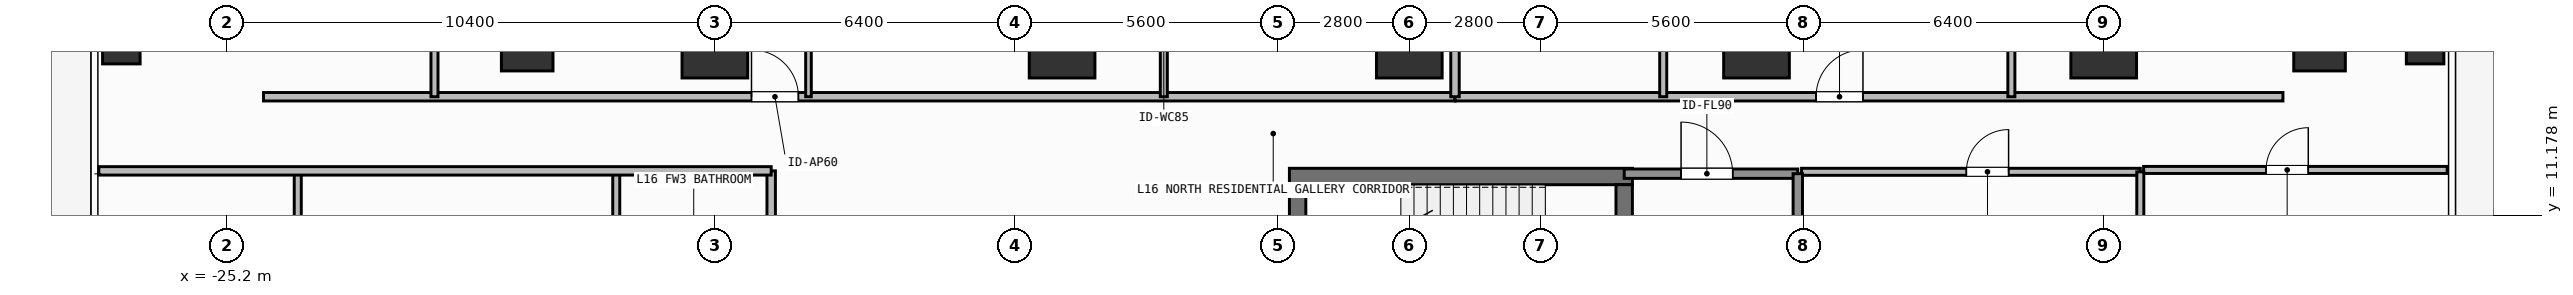
"""IFC4 building model, lengths in metres.
Left out: names, types, materials, properties, quantities, classifications, styles, units other than length and angle.
Written with IfcOpenShell. Run it as: python <this file> out.ifc"""

import sys

from ifc_helpers import new_model, si_unit, direction, frame, frame_2d, origin, origin_2d, place, context, subcontext, project, spatial, rectangle, hollow_rectangle, extrude, element, fill, save


model = new_model("IFC4")
c1 = context("Model", 3, precision=1e-05, world=origin(), true_north=direction((0.0, 1.0)))
c2 = subcontext(c1, "Body", "Model", "MODEL_VIEW")
j1 = project(units=[si_unit("LENGTHUNIT", "METRE"), si_unit("PLANEANGLEUNIT", "RADIAN")], contexts=[c1])
p1 = place(None, origin())
s1 = spatial("IfcSite", under=j1, at=p1, CompositionType="ELEMENT")
p2 = place(p1, origin())
s2 = spatial("IfcBuilding", under=s1, at=p2, CompositionType="ELEMENT")
p3 = place(p2, frame((0.0, 0.0, 61.8)))
s3 = spatial("IfcBuildingStorey", under=s2, at=p3, CompositionType="ELEMENT", Elevation=61.8)
p4 = place(p3, frame((-2.555, 12.0, 0.0), z_axis=(0.0, 0.0, 1.0), x_axis=(1.0, 0.0, 0.0)))
e1 = element("IfcWall", 1, at=p4, inside=s3, PredefinedType="SHEAR", context=c2, shape_type="SweptSolid", body=[
    extrude(rectangle(XDim=7.31, YDim=0.35, at=frame_2d((3.655, 0.0))), origin(), (0.0, 0.0, 1.0), 3.9),
])
p5 = place(p3, frame((-2.38, 8.9, 0.0), z_axis=(0.0, 0.0, 1.0), x_axis=(0.0, 1.0, 0.0)))
e2 = element("IfcWall", 2, at=p5, inside=s3, PredefinedType="SHEAR", context=c2, shape_type="SweptSolid", body=[
    extrude(rectangle(XDim=2.925, YDim=0.35, at=frame_2d((1.462, 0.0))), origin(), (0.0, 0.0, 1.0), 3.9),
])
p6 = place(p3, frame((4.58, 11.825, 0.0), z_axis=(0.0, 0.0, 1.0), x_axis=(0.0, -1.0, 0.0)))
e3 = element("IfcWall", 3, at=p6, inside=s3, PredefinedType="SHEAR", context=c2, shape_type="SweptSolid", body=[
    extrude(rectangle(XDim=2.925, YDim=0.35, at=frame_2d((1.462, 0.0))), origin(), (0.0, 0.0, 1.0), 3.9),
])
p7 = place(p6, frame((0.913, 0.0, 0.0)))
e4 = element("IfcOpeningElement", 4, at=p7, cuts=e3, PredefinedType="OPENING", context=c2, shape_type="SweptSolid", body=[
    extrude(rectangle(XDim=1.1, YDim=2.15, at=frame_2d((0.55, 1.075))), frame((0.0, 0.185, 0.0), z_axis=(0.0, -1.0, 0.0), x_axis=(1.0, 0.0, 0.0)), (0.0, 0.0, 1.0), 0.37),
])
for number, where, z_axis, x_axis in (
    (5, (-14.8, 14.8, 0.0), (0.0, 0.0, 1.0), (1.0, 0.0, 0.0)),
    (6, (-7.4, 14.8, 0.0), (0.0, 0.0, 1.0), (1.0, 0.0, 0.0)),
    (7, (0.0, 14.8, 0.0), (0.0, 0.0, 1.0), (1.0, 0.0, 0.0)),
    (8, (7.4, 14.8, 0.0), (0.0, 0.0, 1.0), (1.0, 0.0, 0.0)),
    (9, (14.8, 14.8, 0.0), (0.0, 0.0, 1.0), (1.0, 0.0, 0.0)),
):
    element("IfcColumn", number, at=place(p3, frame(where, z_axis=z_axis, x_axis=x_axis)), inside=s3, PredefinedType="COLUMN", context=c2, shape_type="SweptSolid", body=[
        extrude(rectangle(XDim=1.4, YDim=1.4, at=origin_2d()), origin(), (0.0, 0.0, 1.0), 3.9),
    ])
for number, where, z_axis, x_axis in (
    (10, (-18.8, 14.8, 0.0), (0.0, 0.0, 1.0), (1.0, 0.0, 0.0)),
    (11, (19.4, 14.8, 0.0), (0.0, 0.0, 1.0), (1.0, 0.0, 0.0)),
):
    element("IfcColumn", number, at=place(p3, frame(where, z_axis=z_axis, x_axis=x_axis)), inside=s3, PredefinedType="COLUMN", context=c2, shape_type="SweptSolid", body=[
        extrude(rectangle(XDim=1.1, YDim=1.1, at=origin_2d()), origin(), (0.0, 0.0, 1.0), 3.9),
    ])
for number, where, z_axis, x_axis in (
    (12, (-27.45, 14.8, 0.0), (0.0, 0.0, 1.0), (1.0, 0.0, 0.0)),
    (13, (21.65, 14.8, 0.0), (0.0, 0.0, 1.0), (1.0, 0.0, 0.0)),
):
    element("IfcColumn", number, at=place(p3, frame(where, z_axis=z_axis, x_axis=x_axis)), inside=s3, PredefinedType="COLUMN", context=c2, shape_type="SweptSolid", body=[
        extrude(hollow_rectangle(XDim=0.8, YDim=0.8, WallThickness=0.036, at=origin_2d()), origin(), (0.0, 0.0, 1.0), 3.9),
    ])
p8 = place(p3, frame((4.58, 12.06, 0.0), z_axis=(0.0, 0.0, 1.0), x_axis=(1.0, 0.0, 0.0)))
e14 = element("IfcWall", 14, at=p8, inside=s3, PredefinedType="SOLIDWALL", context=c2, shape_type="SweptSolid", body=[
    extrude(rectangle(XDim=3.7, YDim=0.2, at=frame_2d((1.85, 0.0))), origin(), (0.0, 0.0, 1.0), 3.68),
])
p9 = place(p8, frame((1.212, 0.0, 0.0)))
e15 = element("IfcOpeningElement", 15, at=p9, cuts=e14, PredefinedType="OPENING", context=c2, shape_type="SweptSolid", body=[
    extrude(rectangle(XDim=1.1, YDim=2.15, at=frame_2d((0.55, 1.075))), frame((0.0, 0.11, 0.0), z_axis=(0.0, -1.0, 0.0), x_axis=(1.0, 0.0, 0.0)), (0.0, 0.0, 1.0), 0.22),
])
p10 = place(p3, frame((8.36, 12.1, 0.0), z_axis=(0.0, 0.0, 1.0), x_axis=(1.0, 0.0, 0.0)))
e16 = element("IfcWall", 16, at=p10, inside=s3, PredefinedType="PARTITIONING", context=c2, shape_type="SweptSolid", body=[
    extrude(rectangle(XDim=7.22, YDim=0.15, at=frame_2d((3.61, 0.0))), origin(), (0.0, 0.0, 1.0), 3.68),
])
p11 = place(p10, frame((3.513, 0.0, 0.0)))
e17 = element("IfcOpeningElement", 17, at=p11, cuts=e16, PredefinedType="OPENING", context=c2, shape_type="SweptSolid", body=[
    extrude(rectangle(XDim=0.9, YDim=2.1, at=frame_2d((0.45, 1.05))), frame((0.0, 0.085, 0.0), z_axis=(0.0, -1.0, 0.0), x_axis=(1.0, 0.0, 0.0)), (0.0, 0.0, 1.0), 0.17),
])
p12 = place(p3, frame((-24.42, 13.7, 0.0), z_axis=(0.0, 0.0, 1.0), x_axis=(1.0, 0.0, 0.0)))
e18 = element("IfcWall", 18, at=p12, inside=s3, PredefinedType="PARTITIONING", context=c2, shape_type="SweptSolid", body=[
    extrude(rectangle(XDim=25.394, YDim=0.18, at=frame_2d((12.697, 0.0))), origin(), (0.0, 0.0, 1.0), 3.68),
])
p13 = place(p12, frame((10.4, 0.0, 0.0)))
e19 = element("IfcOpeningElement", 19, at=p13, cuts=e18, PredefinedType="OPENING", context=c2, shape_type="SweptSolid", body=[
    extrude(rectangle(XDim=1.0, YDim=2.2, at=frame_2d((0.5, 1.1))), frame((0.0, 0.1, 0.0), z_axis=(0.0, -1.0, 0.0), x_axis=(1.0, 0.0, 0.0)), (0.0, 0.0, 1.0), 0.2),
])
p14 = place(p3, frame((-12.805, 13.7, 0.0), z_axis=(0.0, 0.0, 1.0), x_axis=(0.0, 1.0, 0.0)))
e20 = element("IfcWall", 20, at=p14, inside=s3, PredefinedType="PARTITIONING", context=c2, shape_type="SweptSolid", body=[
    extrude(rectangle(XDim=7.09, YDim=0.12, at=frame_2d((3.545, 0.0))), origin(), (0.0, 0.0, 1.0), 3.68),
])
p15 = place(p14, frame((3.006, 0.0, 0.0)))
e21 = element("IfcOpeningElement", 21, at=p15, cuts=e20, PredefinedType="OPENING", context=c2, shape_type="SweptSolid", body=[
    extrude(rectangle(XDim=0.9, YDim=2.1, at=frame_2d((0.45, 1.05))), frame((0.0, 0.07, 0.0), z_axis=(0.0, -1.0, 0.0), x_axis=(1.0, 0.0, 0.0)), (0.0, 0.0, 1.0), 0.14),
])
p16 = place(p3, frame((-20.776, 13.7, 0.0), z_axis=(0.0, 0.0, 1.0), x_axis=(0.0, 1.0, 0.0)))
e22 = element("IfcWall", 22, at=p16, inside=s3, PredefinedType="PARTITIONING", context=c2, shape_type="SweptSolid", body=[
    extrude(rectangle(XDim=7.09, YDim=0.15, at=frame_2d((3.545, 0.0))), origin(), (0.0, 0.0, 1.0), 3.68),
])
p17 = place(p16, frame((3.03, 0.0, 0.0)))
e23 = element("IfcOpeningElement", 23, at=p17, cuts=e22, PredefinedType="OPENING", context=c2, shape_type="SweptSolid", body=[
    extrude(rectangle(XDim=0.85, YDim=2.1, at=frame_2d((0.425, 1.05))), frame((0.0, 0.085, 0.0), z_axis=(0.0, -1.0, 0.0), x_axis=(1.0, 0.0, 0.0)), (0.0, 0.0, 1.0), 0.17),
])
p18 = place(p3, frame((-5.232, 13.7, 0.0), z_axis=(0.0, 0.0, 1.0), x_axis=(0.0, 1.0, 0.0)))
e24 = element("IfcWall", 24, at=p18, inside=s3, PredefinedType="PARTITIONING", context=c2, shape_type="SweptSolid", body=[
    extrude(rectangle(XDim=2.907, YDim=0.15, at=frame_2d((1.454, 0.0))), origin(), (0.0, 0.0, 1.0), 3.68),
])
p19 = place(p18, frame((1.029, 0.0, 0.0)))
e25 = element("IfcOpeningElement", 25, at=p19, cuts=e24, PredefinedType="OPENING", context=c2, shape_type="SweptSolid", body=[
    extrude(rectangle(XDim=0.85, YDim=2.1, at=frame_2d((0.425, 1.05))), frame((0.0, 0.085, 0.0), z_axis=(0.0, -1.0, 0.0), x_axis=(1.0, 0.0, 0.0)), (0.0, 0.0, 1.0), 0.17),
])
p20 = place(p3, frame((0.974, 13.7, 0.0), z_axis=(0.0, 0.0, 1.0), x_axis=(1.0, 0.0, 0.0)))
e26 = element("IfcWall", 26, at=p20, inside=s3, PredefinedType="PARTITIONING", context=c2, shape_type="SweptSolid", body=[
    extrude(rectangle(XDim=17.646, YDim=0.18, at=frame_2d((8.823, 0.0))), origin(), (0.0, 0.0, 1.0), 3.68),
])
p21 = place(p20, frame((7.695, 0.0, 0.0)))
e27 = element("IfcOpeningElement", 27, at=p21, cuts=e26, PredefinedType="OPENING", context=c2, shape_type="SweptSolid", body=[
    extrude(rectangle(XDim=1.0, YDim=2.2, at=frame_2d((0.5, 1.1))), frame((0.0, 0.1, 0.0), z_axis=(0.0, -1.0, 0.0), x_axis=(1.0, 0.0, 0.0)), (0.0, 0.0, 1.0), 0.2),
])
p22 = place(p3, frame((5.412, 13.7, 0.0), z_axis=(0.0, 0.0, 1.0), x_axis=(0.0, 1.0, 0.0)))
e28 = element("IfcWall", 28, at=p22, inside=s3, PredefinedType="PARTITIONING", context=c2, shape_type="SweptSolid", body=[
    extrude(rectangle(XDim=7.09, YDim=0.15, at=frame_2d((3.545, 0.0))), origin(), (0.0, 0.0, 1.0), 3.68),
])
p23 = place(p22, frame((3.03, 0.0, 0.0)))
e29 = element("IfcOpeningElement", 29, at=p23, cuts=e28, PredefinedType="OPENING", context=c2, shape_type="SweptSolid", body=[
    extrude(rectangle(XDim=0.85, YDim=2.1, at=frame_2d((0.425, 1.05))), frame((0.0, 0.085, 0.0), z_axis=(0.0, -1.0, 0.0), x_axis=(1.0, 0.0, 0.0)), (0.0, 0.0, 1.0), 0.17),
])
p24 = place(p3, frame((12.832, 13.7, 0.0), z_axis=(0.0, 0.0, 1.0), x_axis=(0.0, 1.0, 0.0)))
e30 = element("IfcWall", 30, at=p24, inside=s3, PredefinedType="PARTITIONING", context=c2, shape_type="SweptSolid", body=[
    extrude(rectangle(XDim=4.963, YDim=0.15, at=frame_2d((2.481, 0.0))), origin(), (0.0, 0.0, 1.0), 3.68),
])
p25 = place(p24, frame((2.056, 0.0, 0.0)))
e31 = element("IfcOpeningElement", 31, at=p25, cuts=e30, PredefinedType="OPENING", context=c2, shape_type="SweptSolid", body=[
    extrude(rectangle(XDim=0.85, YDim=2.1, at=frame_2d((0.425, 1.05))), frame((0.0, 0.085, 0.0), z_axis=(0.0, -1.0, 0.0), x_axis=(1.0, 0.0, 0.0)), (0.0, 0.0, 1.0), 0.17),
])
p26 = place(p3, frame((-13.6, 4.04, 0.0), z_axis=(0.0, 0.0, 1.0), x_axis=(0.0, 1.0, 0.0)))
e32 = element("IfcWall", 32, at=p26, inside=s3, PredefinedType="PARTITIONING", context=c2, shape_type="SweptSolid", body=[
    extrude(rectangle(XDim=8.08, YDim=0.18, at=frame_2d((4.04, 0.0))), origin(), (0.0, 0.0, 1.0), 3.68),
])
p27 = place(p26, frame((1.583, 0.0, 0.0)))
e33 = element("IfcOpeningElement", 33, at=p27, cuts=e32, PredefinedType="OPENING", context=c2, shape_type="SweptSolid", body=[
    extrude(rectangle(XDim=1.0, YDim=2.2, at=frame_2d((0.5, 1.1))), frame((0.0, 0.1, 0.0), z_axis=(0.0, -1.0, 0.0), x_axis=(1.0, 0.0, 0.0)), (0.0, 0.0, 1.0), 0.2),
])
p28 = place(p3, frame((15.65, 12.14, 0.0), z_axis=(0.0, 0.0, 1.0), x_axis=(1.0, 0.0, 0.0)))
e34 = element("IfcWall", 34, at=p28, inside=s3, PredefinedType="PARTITIONING", context=c2, shape_type="SweptSolid", body=[
    extrude(rectangle(XDim=6.47, YDim=0.15, at=frame_2d((3.235, 0.0))), origin(), (0.0, 0.0, 1.0), 3.68),
])
p29 = place(p28, frame((2.61, 0.0, 0.0)))
e35 = element("IfcOpeningElement", 35, at=p29, cuts=e34, PredefinedType="OPENING", context=c2, shape_type="SweptSolid", body=[
    extrude(rectangle(XDim=0.9, YDim=2.1, at=frame_2d((0.45, 1.05))), frame((0.0, 0.085, 0.0), z_axis=(0.0, -1.0, 0.0), x_axis=(1.0, 0.0, 0.0)), (0.0, 0.0, 1.0), 0.17),
])
p30 = place(p3, frame((8.28, 8.95, 0.0), z_axis=(0.0, 0.0, 1.0), x_axis=(0.0, 1.0, 0.0)))
e36 = element("IfcWall", 36, at=p30, inside=s3, PredefinedType="SOLIDWALL", context=c2, shape_type="SweptSolid", body=[
    extrude(rectangle(XDim=3.11, YDim=0.2, at=frame_2d((1.555, 0.0))), origin(), (0.0, 0.0, 1.0), 3.68),
])
p31 = place(p3, frame((15.58, 5.85, 0.0), z_axis=(0.0, 0.0, 1.0), x_axis=(0.0, 1.0, 0.0)))
e37 = element("IfcWall", 37, at=p31, inside=s3, PredefinedType="PARTITIONING", context=c2, shape_type="SweptSolid", body=[
    extrude(rectangle(XDim=6.25, YDim=0.15, at=frame_2d((3.125, 0.0))), origin(), (0.0, 0.0, 1.0), 3.68),
])
p32 = place(p3, frame((0.974, 13.7, 0.0), z_axis=(0.0, 0.0, 1.0), x_axis=(0.0, 1.0, 0.0)))
e38 = element("IfcWall", 38, at=p32, inside=s3, PredefinedType="PARTITIONING", context=c2, shape_type="SweptSolid", body=[
    extrude(rectangle(XDim=11.33, YDim=0.18, at=frame_2d((5.665, 0.0))), origin(), (0.0, 0.0, 1.0), 3.68),
])
for number, where, z_axis, x_axis in (
    (39, (-16.902, 9.32, 0.0), (0.0, 0.0, 1.0), (0.0, 1.0, 0.0)),
    (40, (-23.69, 9.32, 0.0), (0.0, 0.0, 1.0), (0.0, 1.0, 0.0)),
):
    element("IfcWall", number, at=place(p3, frame(where, z_axis=z_axis, x_axis=x_axis)), inside=s3, PredefinedType="PARTITIONING", context=c2, shape_type="SweptSolid", body=[
        extrude(rectangle(XDim=2.8, YDim=0.15, at=frame_2d((1.4, 0.0))), origin(), (0.0, 0.0, 1.0), 3.68),
    ])
p33 = place(p3, frame((-27.93, 12.12, 0.0), z_axis=(0.0, 0.0, 1.0), x_axis=(1.0, 0.0, 0.0)))
e41 = element("IfcWall", 41, at=p33, inside=s3, PredefinedType="PARTITIONING", context=c2, shape_type="SweptSolid", body=[
    extrude(rectangle(XDim=14.33, YDim=0.18, at=frame_2d((7.165, 0.0))), origin(), (0.0, 0.0, 1.0), 3.68),
])
p34 = place(p9, origin())
e42 = element("IfcDoor", 42, at=p34, inside=s3, OperationType="SINGLE_SWING_LEFT", PredefinedType="DOOR", context=c2, shape_type="SweptSolid", body=[
    extrude(rectangle(XDim=1.1, YDim=2.15, at=frame_2d((0.55, 1.075))), frame((0.0, 0.025, 0.0), z_axis=(0.0, -1.0, 0.0), x_axis=(1.0, 0.0, 0.0)), (0.0, 0.0, 1.0), 0.05),
])
fill(e15, e42)
p35 = place(p11, origin())
e43 = element("IfcDoor", 43, at=p35, inside=s3, OperationType="SINGLE_SWING_RIGHT", PredefinedType="DOOR", context=c2, shape_type="SweptSolid", body=[
    extrude(rectangle(XDim=0.9, YDim=2.1, at=frame_2d((0.45, 1.05))), frame((0.0, 0.025, 0.0), z_axis=(0.0, -1.0, 0.0), x_axis=(1.0, 0.0, 0.0)), (0.0, 0.0, 1.0), 0.05),
])
fill(e17, e43)
p36 = place(p13, origin())
e44 = element("IfcDoor", 44, at=p36, inside=s3, OperationType="SINGLE_SWING_LEFT", PredefinedType="DOOR", context=c2, shape_type="SweptSolid", body=[
    extrude(rectangle(XDim=1.0, YDim=2.2, at=frame_2d((0.5, 1.1))), frame((0.0, 0.025, 0.0), z_axis=(0.0, -1.0, 0.0), x_axis=(1.0, 0.0, 0.0)), (0.0, 0.0, 1.0), 0.05),
])
fill(e19, e44)
p37 = place(p21, origin())
e45 = element("IfcDoor", 45, at=p37, inside=s3, OperationType="SINGLE_SWING_RIGHT", PredefinedType="DOOR", context=c2, shape_type="SweptSolid", body=[
    extrude(rectangle(XDim=1.0, YDim=2.2, at=frame_2d((0.5, 1.1))), frame((0.0, 0.025, 0.0), z_axis=(0.0, -1.0, 0.0), x_axis=(1.0, 0.0, 0.0)), (0.0, 0.0, 1.0), 0.05),
])
fill(e27, e45)
p38 = place(p29, origin())
e46 = element("IfcDoor", 46, at=p38, inside=s3, OperationType="SINGLE_SWING_RIGHT", PredefinedType="DOOR", context=c2, shape_type="SweptSolid", body=[
    extrude(rectangle(XDim=0.9, YDim=2.1, at=frame_2d((0.45, 1.05))), frame((0.0, 0.025, 0.0), z_axis=(0.0, -1.0, 0.0), x_axis=(1.0, 0.0, 0.0)), (0.0, 0.0, 1.0), 0.05),
])
fill(e35, e46)
save(model, sys.argv[1])
